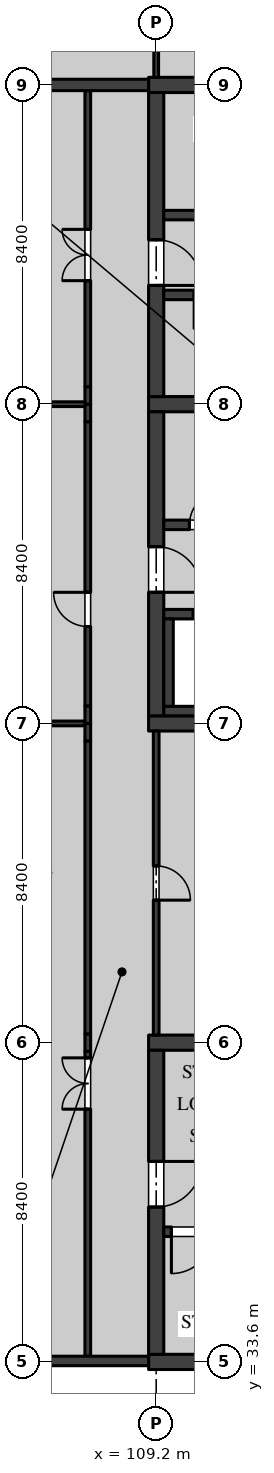
"""IFC4 building model, lengths in metres.
Left out: names, types, materials, properties, quantities, classifications, styles, units other than length and angle.
Written with IfcOpenShell. Run it as: python <this file> out.ifc"""

import sys

from ifc_helpers import new_model, si_unit, direction, frame, frame_2d, origin, place, context, subcontext, project, spatial, rectangle, extrude, element, fill, save


model = new_model("IFC4")
c1 = context("Model", 3, precision=1e-05, world=origin(), true_north=direction((0.0, 1.0)))
c2 = subcontext(c1, "Body", "Model", "MODEL_VIEW")
j1 = project(units=[si_unit("LENGTHUNIT", "METRE"), si_unit("PLANEANGLEUNIT", "RADIAN")], contexts=[c1])
p1 = place(None, origin())
s1 = spatial("IfcSite", under=j1, at=p1, CompositionType="ELEMENT")
p2 = place(p1, origin())
s2 = spatial("IfcBuilding", under=s1, at=p2, CompositionType="ELEMENT")
p3 = place(p2, frame((0.0, 0.0, 18.9)))
s3 = spatial("IfcBuildingStorey", under=s2, at=p3, CompositionType="ELEMENT", Elevation=18.9)
p4 = place(p3, frame((109.0, 50.4, 0.0), z_axis=(0.0, 0.0, 1.0), x_axis=(1.0, 0.0, 0.0)))
e1 = element("IfcWall", 1, at=p4, inside=s3, PredefinedType="SHEAR", context=c2, shape_type="SweptSolid", body=[
    extrude(rectangle(XDim=8.8, YDim=0.4, at=frame_2d((4.4, 0.0))), origin(), (0.0, 0.0, 1.0), 4.37),
])
p5 = place(p3, frame((109.0, 58.8, 0.0), z_axis=(0.0, 0.0, 1.0), x_axis=(1.0, 0.0, 0.0)))
e2 = element("IfcWall", 2, at=p5, inside=s3, PredefinedType="SHEAR", context=c2, shape_type="SweptSolid", body=[
    extrude(rectangle(XDim=8.8, YDim=0.4, at=frame_2d((4.4, 0.0))), origin(), (0.0, 0.0, 1.0), 4.37),
])
p6 = place(p5, frame((6.65, 0.0, 0.0)))
e3 = element("IfcOpeningElement", 3, at=p6, cuts=e2, PredefinedType="OPENING", context=c2, shape_type="SweptSolid", body=[
    extrude(rectangle(XDim=1.1, YDim=2.1, at=frame_2d((0.55, 1.05))), frame((0.0, 0.21, 0.0), z_axis=(0.0, -1.0, 0.0), x_axis=(1.0, 0.0, 0.0)), (0.0, 0.0, 1.0), 0.42),
])
p7 = place(p3, frame((109.2, 50.6, 0.0), z_axis=(0.0, 0.0, 1.0), x_axis=(0.0, 1.0, 0.0)))
e4 = element("IfcWall", 4, at=p7, inside=s3, PredefinedType="SHEAR", context=c2, shape_type="SweptSolid", body=[
    extrude(rectangle(XDim=8.0, YDim=0.4, at=frame_2d((4.0, 0.0))), origin(), (0.0, 0.0, 1.0), 4.37),
])
p8 = place(p7, frame((3.25, 0.0, 0.0)))
e5 = element("IfcOpeningElement", 5, at=p8, cuts=e4, PredefinedType="OPENING", context=c2, shape_type="SweptSolid", body=[
    extrude(rectangle(XDim=1.2, YDim=2.1, at=frame_2d((0.6, 1.05))), frame((0.0, 0.21, 0.0), z_axis=(0.0, -1.0, 0.0), x_axis=(1.0, 0.0, 0.0)), (0.0, 0.0, 1.0), 0.42),
])
p9 = place(p3, frame((109.4, 55.625, 0.0), z_axis=(0.0, 0.0, 1.0), x_axis=(1.0, 0.0, 0.0)))
e6 = element("IfcWall", 6, at=p9, inside=s3, PredefinedType="SOLIDWALL", context=c2, shape_type="SweptSolid", body=[
    extrude(rectangle(XDim=2.25, YDim=0.25, at=frame_2d((1.125, 0.0))), origin(), (0.0, 0.0, 1.0), 4.37),
])
p10 = place(p9, frame((0.675, 0.0, 0.0)))
e7 = element("IfcOpeningElement", 7, at=p10, cuts=e6, PredefinedType="OPENING", context=c2, shape_type="SweptSolid", body=[
    extrude(rectangle(XDim=0.9, YDim=2.1, at=frame_2d((0.45, 1.05))), frame((0.0, 0.135, 0.0), z_axis=(0.0, -1.0, 0.0), x_axis=(1.0, 0.0, 0.0)), (0.0, 0.0, 1.0), 0.27),
])
p11 = place(p3, frame((109.0, 67.2, 0.0), z_axis=(0.0, 0.0, 1.0), x_axis=(1.0, 0.0, 0.0)))
e8 = element("IfcWall", 8, at=p11, inside=s3, PredefinedType="SHEAR", context=c2, shape_type="SweptSolid", body=[
    extrude(rectangle(XDim=8.8, YDim=0.4, at=frame_2d((4.4, 0.0))), origin(), (0.0, 0.0, 1.0), 4.37),
])
p12 = place(p3, frame((109.2, 59.0, 0.0), z_axis=(0.0, 0.0, 1.0), x_axis=(0.0, 1.0, 0.0)))
e9 = element("IfcWall", 9, at=p12, inside=s3, PredefinedType="SHEAR", context=c2, shape_type="SweptSolid", body=[
    extrude(rectangle(XDim=8.0, YDim=0.4, at=frame_2d((4.0, 0.0))), origin(), (0.0, 0.0, 1.0), 4.37),
])
p13 = place(p12, frame((2.925, 0.0, 0.0)))
e10 = element("IfcOpeningElement", 10, at=p13, cuts=e9, PredefinedType="OPENING", context=c2, shape_type="SweptSolid", body=[
    extrude(rectangle(XDim=1.2, YDim=2.1, at=frame_2d((0.6, 1.05))), frame((0.0, 0.21, 0.0), z_axis=(0.0, -1.0, 0.0), x_axis=(1.0, 0.0, 0.0)), (0.0, 0.0, 1.0), 0.42),
])
p14 = place(p3, frame((117.4, 63.775, 0.0), z_axis=(0.0, 0.0, 1.0), x_axis=(-1.0, 0.0, 0.0)))
e11 = element("IfcWall", 11, at=p14, inside=s3, PredefinedType="SOLIDWALL", context=c2, shape_type="SweptSolid", body=[
    extrude(rectangle(XDim=8.0, YDim=0.25, at=frame_2d((4.0, 0.0))), origin(), (0.0, 0.0, 1.0), 4.37),
])
p15 = place(p14, frame((0.2, 0.0, 0.0)))
e12 = element("IfcOpeningElement", 12, at=p15, cuts=e11, PredefinedType="OPENING", context=c2, shape_type="SweptSolid", body=[
    extrude(rectangle(XDim=1.1, YDim=2.1, at=frame_2d((0.55, 1.05))), frame((0.0, 0.135, 0.0), z_axis=(0.0, -1.0, 0.0), x_axis=(1.0, 0.0, 0.0)), (0.0, 0.0, 1.0), 0.27),
])
p16 = place(p3, frame((114.75, 61.675, 0.0), z_axis=(0.0, 0.0, 1.0), x_axis=(-1.0, 0.0, 0.0)))
e13 = element("IfcWall", 13, at=p16, inside=s3, PredefinedType="SOLIDWALL", context=c2, shape_type="SweptSolid", body=[
    extrude(rectangle(XDim=5.35, YDim=0.25, at=frame_2d((2.675, 0.0))), origin(), (0.0, 0.0, 1.0), 4.37),
])
p17 = place(p16, frame((3.65, 0.0, 0.0)))
e14 = element("IfcOpeningElement", 14, at=p17, cuts=e13, PredefinedType="OPENING", context=c2, shape_type="SweptSolid", body=[
    extrude(rectangle(XDim=0.9, YDim=2.1, at=frame_2d((0.45, 1.05))), frame((0.0, 0.135, 0.0), z_axis=(0.0, -1.0, 0.0), x_axis=(1.0, 0.0, 0.0)), (0.0, 0.0, 1.0), 0.27),
])
p18 = place(p16, frame((0.9, 0.0, 0.0)))
e15 = element("IfcOpeningElement", 15, at=p18, cuts=e13, PredefinedType="OPENING", context=c2, shape_type="SweptSolid", body=[
    extrude(rectangle(XDim=0.8, YDim=2.1, at=frame_2d((0.4, 1.05))), frame((0.0, 0.135, 0.0), z_axis=(0.0, -1.0, 0.0), x_axis=(1.0, 0.0, 0.0)), (0.0, 0.0, 1.0), 0.27),
])
for number, where, z_axis, x_axis in (
    (16, (109.0, 33.6, 0.0), (0.0, 0.0, 1.0), (1.0, 0.0, 0.0)),
    (17, (109.0, 42.0, 0.0), (0.0, 0.0, 1.0), (1.0, 0.0, 0.0)),
):
    element("IfcWall", number, at=place(p3, frame(where, z_axis=z_axis, x_axis=x_axis)), inside=s3, PredefinedType="SHEAR", context=c2, shape_type="SweptSolid", body=[
        extrude(rectangle(XDim=8.8, YDim=0.4, at=frame_2d((4.4, 0.0))), origin(), (0.0, 0.0, 1.0), 4.37),
    ])
p19 = place(p3, frame((109.2, 33.8, 0.0), z_axis=(0.0, 0.0, 1.0), x_axis=(0.0, 1.0, 0.0)))
e18 = element("IfcWall", 18, at=p19, inside=s3, PredefinedType="SHEAR", context=c2, shape_type="SweptSolid", body=[
    extrude(rectangle(XDim=8.0, YDim=0.4, at=frame_2d((4.0, 0.0))), origin(), (0.0, 0.0, 1.0), 4.37),
])
p20 = place(p19, frame((3.875, 0.0, 0.0)))
e19 = element("IfcOpeningElement", 19, at=p20, cuts=e18, PredefinedType="OPENING", context=c2, shape_type="SweptSolid", body=[
    extrude(rectangle(XDim=1.2, YDim=2.1, at=frame_2d((0.6, 1.05))), frame((0.0, 0.21, 0.0), z_axis=(0.0, -1.0, 0.0), x_axis=(1.0, 0.0, 0.0)), (0.0, 0.0, 1.0), 0.42),
])
p21 = place(p3, frame((109.4, 37.025, 0.0), z_axis=(0.0, 0.0, 1.0), x_axis=(1.0, 0.0, 0.0)))
e20 = element("IfcWall", 20, at=p21, inside=s3, PredefinedType="SOLIDWALL", context=c2, shape_type="SweptSolid", body=[
    extrude(rectangle(XDim=8.0, YDim=0.25, at=frame_2d((4.0, 0.0))), origin(), (0.0, 0.0, 1.0), 4.37),
])
p22 = place(p21, frame((0.2, 0.0, 0.0)))
e21 = element("IfcOpeningElement", 21, at=p22, cuts=e20, PredefinedType="OPENING", context=c2, shape_type="SweptSolid", body=[
    extrude(rectangle(XDim=1.1, YDim=2.1, at=frame_2d((0.55, 1.05))), frame((0.0, 0.135, 0.0), z_axis=(0.0, -1.0, 0.0), x_axis=(1.0, 0.0, 0.0)), (0.0, 0.0, 1.0), 0.27),
])
p23 = place(p3, frame((109.4, 53.275, 0.0), z_axis=(0.0, 0.0, 1.0), x_axis=(1.0, 0.0, 0.0)))
e22 = element("IfcWall", 22, at=p23, inside=s3, PredefinedType="SOLIDWALL", context=c2, shape_type="SweptSolid", body=[
    extrude(rectangle(XDim=2.65, YDim=0.25, at=frame_2d((1.325, 0.0))), origin(), (0.0, 0.0, 1.0), 4.37),
])
p24 = place(p23, frame((0.775, 0.0, 0.0)))
e23 = element("IfcOpeningElement", 23, at=p24, cuts=e22, PredefinedType="OPENING", context=c2, shape_type="SweptSolid", body=[
    extrude(rectangle(XDim=1.1, YDim=2.1, at=frame_2d((0.55, 1.05))), frame((0.0, 0.135, 0.0), z_axis=(0.0, -1.0, 0.0), x_axis=(1.0, 0.0, 0.0)), (0.0, 0.0, 1.0), 0.27),
])
p25 = place(p3, frame((109.4, 50.725, 0.0), z_axis=(0.0, 0.0, 1.0), x_axis=(1.0, 0.0, 0.0)))
e24 = element("IfcWall", 24, at=p25, inside=s3, PredefinedType="SOLIDWALL", context=c2, shape_type="SweptSolid", body=[
    extrude(rectangle(XDim=2.65, YDim=0.25, at=frame_2d((1.325, 0.0))), origin(), (0.0, 0.0, 1.0), 4.37),
])
p26 = place(p3, frame((109.525, 50.85, 0.0), z_axis=(0.0, 0.0, 1.0), x_axis=(0.0, 1.0, 0.0)))
e25 = element("IfcWall", 25, at=p26, inside=s3, PredefinedType="SOLIDWALL", context=c2, shape_type="SweptSolid", body=[
    extrude(rectangle(XDim=2.3, YDim=0.25, at=frame_2d((1.15, 0.0))), origin(), (0.0, 0.0, 1.0), 4.37),
])
p27 = place(p3, frame((109.2, 42.2, 0.0), z_axis=(0.0, 0.0, 1.0), x_axis=(0.0, 1.0, 0.0)))
e26 = element("IfcWall", 26, at=p27, inside=s3, PredefinedType="PARTITIONING", context=c2, shape_type="SweptSolid", body=[
    extrude(rectangle(XDim=8.0, YDim=0.15, at=frame_2d((4.0, 0.0))), origin(), (0.0, 0.0, 1.0), 3.746),
])
p28 = place(p27, frame((3.55, 0.0, 0.0)))
e27 = element("IfcOpeningElement", 27, at=p28, cuts=e26, PredefinedType="OPENING", context=c2, shape_type="SweptSolid", body=[
    extrude(rectangle(XDim=0.9, YDim=2.1, at=frame_2d((0.45, 1.05))), frame((0.0, 0.085, 0.0), z_axis=(0.0, -1.0, 0.0), x_axis=(1.0, 0.0, 0.0)), (0.0, 0.0, 1.0), 0.17),
])
p29 = place(p3, frame((107.4, 33.75, 0.0), z_axis=(0.0, 0.0, 1.0), x_axis=(0.0, 1.0, 0.0)))
e28 = element("IfcWall", 28, at=p29, inside=s3, PredefinedType="PARTITIONING", context=c2, shape_type="SweptSolid", body=[
    extrude(rectangle(XDim=8.02, YDim=0.15, at=frame_2d((4.01, 0.0))), origin(), (0.0, 0.0, 1.0), 4.37),
])
p30 = place(p29, frame((6.5, 0.0, 0.0)))
e29 = element("IfcOpeningElement", 29, at=p30, cuts=e28, PredefinedType="OPENING", context=c2, shape_type="SweptSolid", body=[
    extrude(rectangle(XDim=1.35, YDim=2.1, at=frame_2d((0.675, 1.05))), frame((0.0, 0.085, 0.0), z_axis=(0.0, -1.0, 0.0), x_axis=(1.0, 0.0, 0.0)), (0.0, 0.0, 1.0), 0.17),
])
p31 = place(p3, frame((107.4, 41.77, 0.0), z_axis=(0.0, 0.0, 1.0), x_axis=(0.0, 1.0, 0.0)))
e30 = element("IfcWall", 30, at=p31, inside=s3, PredefinedType="PARTITIONING", context=c2, shape_type="SweptSolid", body=[
    extrude(rectangle(XDim=0.46, YDim=0.15, at=frame_2d((0.23, 0.0))), origin(), (0.0, 0.0, 1.0), 3.746),
])
p32 = place(p3, frame((107.4, 42.23, 0.0), z_axis=(0.0, 0.0, 1.0), x_axis=(0.0, 1.0, 0.0)))
e31 = element("IfcWall", 31, at=p32, inside=s3, PredefinedType="PARTITIONING", context=c2, shape_type="SweptSolid", body=[
    extrude(rectangle(XDim=7.71, YDim=0.15, at=frame_2d((3.855, 0.0))), origin(), (0.0, 0.0, 1.0), 4.37),
])
p33 = place(p3, frame((107.4, 49.94, 0.0), z_axis=(0.0, 0.0, 1.0), x_axis=(0.0, 1.0, 0.0)))
e32 = element("IfcWall", 32, at=p33, inside=s3, PredefinedType="PARTITIONING", context=c2, shape_type="SweptSolid", body=[
    extrude(rectangle(XDim=0.46, YDim=0.15, at=frame_2d((0.23, 0.0))), origin(), (0.0, 0.0, 1.0), 3.746),
])
p34 = place(p3, frame((107.4, 50.4, 0.0), z_axis=(0.0, 0.0, 1.0), x_axis=(0.0, 1.0, 0.0)))
e33 = element("IfcWall", 33, at=p34, inside=s3, PredefinedType="PARTITIONING", context=c2, shape_type="SweptSolid", body=[
    extrude(rectangle(XDim=0.46, YDim=0.15, at=frame_2d((0.23, 0.0))), origin(), (0.0, 0.0, 1.0), 3.746),
])
p35 = place(p3, frame((107.4, 50.86, 0.0), z_axis=(0.0, 0.0, 1.0), x_axis=(0.0, 1.0, 0.0)))
e34 = element("IfcWall", 34, at=p35, inside=s3, PredefinedType="PARTITIONING", context=c2, shape_type="SweptSolid", body=[
    extrude(rectangle(XDim=7.48, YDim=0.15, at=frame_2d((3.74, 0.0))), origin(), (0.0, 0.0, 1.0), 4.37),
])
p36 = place(p35, frame((2.09, 0.0, 0.0)))
e35 = element("IfcOpeningElement", 35, at=p36, cuts=e34, PredefinedType="OPENING", context=c2, shape_type="SweptSolid", body=[
    extrude(rectangle(XDim=0.9, YDim=2.1, at=frame_2d((0.45, 1.05))), frame((0.0, 0.085, 0.0), z_axis=(0.0, -1.0, 0.0), x_axis=(1.0, 0.0, 0.0)), (0.0, 0.0, 1.0), 0.17),
])
for number, where, z_axis, x_axis in (
    (36, (107.4, 58.34, 0.0), (0.0, 0.0, 1.0), (0.0, 1.0, 0.0)),
    (37, (107.4, 58.8, 0.0), (0.0, 0.0, 1.0), (0.0, 1.0, 0.0)),
):
    element("IfcWall", number, at=place(p3, frame(where, z_axis=z_axis, x_axis=x_axis)), inside=s3, PredefinedType="PARTITIONING", context=c2, shape_type="SweptSolid", body=[
        extrude(rectangle(XDim=0.46, YDim=0.15, at=frame_2d((0.23, 0.0))), origin(), (0.0, 0.0, 1.0), 3.746),
    ])
p37 = place(p3, frame((107.4, 59.26, 0.0), z_axis=(0.0, 0.0, 1.0), x_axis=(0.0, 1.0, 0.0)))
e38 = element("IfcWall", 38, at=p37, inside=s3, PredefinedType="PARTITIONING", context=c2, shape_type="SweptSolid", body=[
    extrude(rectangle(XDim=7.79, YDim=0.15, at=frame_2d((3.895, 0.0))), origin(), (0.0, 0.0, 1.0), 4.37),
])
p38 = place(p37, frame((2.79, 0.0, 0.0)))
e39 = element("IfcOpeningElement", 39, at=p38, cuts=e38, PredefinedType="OPENING", context=c2, shape_type="SweptSolid", body=[
    extrude(rectangle(XDim=1.35, YDim=2.1, at=frame_2d((0.675, 1.05))), frame((0.0, 0.085, 0.0), z_axis=(0.0, -1.0, 0.0), x_axis=(1.0, 0.0, 0.0)), (0.0, 0.0, 1.0), 0.17),
])
for number, where, z_axis, x_axis in (
    (40, (105.0, 50.4, 0.0), (0.0, 0.0, 1.0), (1.0, 0.0, 0.0)),
    (41, (105.0, 58.8, 0.0), (0.0, 0.0, 1.0), (1.0, 0.0, 0.0)),
):
    element("IfcWall", number, at=place(p3, frame(where, z_axis=z_axis, x_axis=x_axis)), inside=s3, PredefinedType="PARTITIONING", context=c2, shape_type="SweptSolid", body=[
        extrude(rectangle(XDim=2.325, YDim=0.125, at=frame_2d((1.163, 0.0))), origin(), (0.0, 0.0, 1.0), 3.746),
    ])
p39 = place(p3, frame((109.2, 67.4, 0.0), z_axis=(0.0, 0.0, 1.0), x_axis=(0.0, 1.0, 0.0)))
e42 = element("IfcWall", 42, at=p39, inside=s3, PredefinedType="PARTITIONING", context=c2, shape_type="SweptSolid", body=[
    extrude(rectangle(XDim=6.625, YDim=0.125, at=frame_2d((3.312, 0.0))), origin(), (0.0, 0.0, 1.0), 3.819),
])
p40 = place(p3, frame((100.803, 33.625, 0.0), z_axis=(0.0, 0.0, 1.0), x_axis=(1.0, 0.0, 0.0)))
e43 = element("IfcWall", 43, at=p40, inside=s3, PredefinedType="SOLIDWALL", context=c2, shape_type="SweptSolid", body=[
    extrude(rectangle(XDim=8.197, YDim=0.25, at=frame_2d((4.099, 0.0))), origin(), (0.0, 0.0, 1.0), 3.746),
])
p41 = place(p40, frame((0.897, 0.0, 0.9)))
e44 = element("IfcOpeningElement", 44, at=p41, cuts=e43, PredefinedType="OPENING", context=c2, shape_type="SweptSolid", body=[
    extrude(rectangle(XDim=2.4, YDim=2.1, at=frame_2d((1.2, 1.05))), frame((0.0, 0.135, 0.0), z_axis=(0.0, -1.0, 0.0), x_axis=(1.0, 0.0, 0.0)), (0.0, 0.0, 1.0), 0.27),
])
p42 = place(p3, frame((109.0, 67.2, 0.0), z_axis=(0.0, 0.0, 1.0), x_axis=(-1.0, 0.0, 0.0)))
e45 = element("IfcWall", 45, at=p42, inside=s3, PredefinedType="SOLIDWALL", context=c2, shape_type="SweptSolid", body=[
    extrude(rectangle(XDim=8.197, YDim=0.3, at=frame_2d((4.099, 0.0))), origin(), (0.0, 0.0, 1.0), 3.746),
])
p43 = place(p8, frame((1.2, 0.0, 0.0), z_axis=(0.0, 0.0, 1.0), x_axis=(-1.0, 0.0, 0.0)))
e46 = element("IfcDoor", 46, at=p43, inside=s3, OperationType="SINGLE_SWING_LEFT", PredefinedType="DOOR", context=c2, shape_type="SweptSolid", body=[
    extrude(rectangle(XDim=1.2, YDim=2.1, at=frame_2d((0.6, 1.05))), frame((0.0, 0.035, 0.0), z_axis=(0.0, -1.0, 0.0), x_axis=(1.0, 0.0, 0.0)), (0.0, 0.0, 1.0), 0.07),
])
fill(e5, e46)
p44 = place(p10, origin())
e47 = element("IfcDoor", 47, at=p44, inside=s3, OperationType="SINGLE_SWING_LEFT", PredefinedType="DOOR", context=c2, shape_type="SweptSolid", body=[
    extrude(rectangle(XDim=0.9, YDim=2.1, at=frame_2d((0.45, 1.05))), frame((0.0, 0.05, 0.0), z_axis=(0.0, -1.0, 0.0), x_axis=(1.0, 0.0, 0.0)), (0.0, 0.0, 1.0), 0.1),
])
fill(e7, e47)
p45 = place(p13, frame((1.2, 0.0, 0.0), z_axis=(0.0, 0.0, 1.0), x_axis=(-1.0, 0.0, 0.0)))
e48 = element("IfcDoor", 48, at=p45, inside=s3, OperationType="SINGLE_SWING_LEFT", PredefinedType="DOOR", context=c2, shape_type="SweptSolid", body=[
    extrude(rectangle(XDim=1.2, YDim=2.1, at=frame_2d((0.6, 1.05))), frame((0.0, 0.035, 0.0), z_axis=(0.0, -1.0, 0.0), x_axis=(1.0, 0.0, 0.0)), (0.0, 0.0, 1.0), 0.07),
])
fill(e10, e48)
p46 = place(p20, frame((1.2, 0.0, 0.0), z_axis=(0.0, 0.0, 1.0), x_axis=(-1.0, 0.0, 0.0)))
e49 = element("IfcDoor", 49, at=p46, inside=s3, OperationType="SINGLE_SWING_RIGHT", PredefinedType="DOOR", context=c2, shape_type="SweptSolid", body=[
    extrude(rectangle(XDim=1.2, YDim=2.1, at=frame_2d((0.6, 1.05))), frame((0.0, 0.035, 0.0), z_axis=(0.0, -1.0, 0.0), x_axis=(1.0, 0.0, 0.0)), (0.0, 0.0, 1.0), 0.07),
])
fill(e19, e49)
p47 = place(p22, frame((1.1, 0.0, 0.0), z_axis=(0.0, 0.0, 1.0), x_axis=(-1.0, 0.0, 0.0)))
e50 = element("IfcDoor", 50, at=p47, inside=s3, OperationType="SINGLE_SWING_LEFT", PredefinedType="DOOR", context=c2, shape_type="SweptSolid", body=[
    extrude(rectangle(XDim=1.1, YDim=2.1, at=frame_2d((0.55, 1.05))), frame((0.0, 0.035, 0.0), z_axis=(0.0, -1.0, 0.0), x_axis=(1.0, 0.0, 0.0)), (0.0, 0.0, 1.0), 0.07),
])
fill(e21, e50)
p48 = place(p24, origin())
e51 = element("IfcDoor", 51, at=p48, inside=s3, OperationType="DOUBLE_DOOR_SLIDING", PredefinedType="DOOR", context=c2, shape_type="SweptSolid", body=[
    extrude(rectangle(XDim=1.1, YDim=2.1, at=frame_2d((0.55, 1.05))), frame((0.0, 0.04, 0.0), z_axis=(0.0, -1.0, 0.0), x_axis=(1.0, 0.0, 0.0)), (0.0, 0.0, 1.0), 0.08),
])
fill(e23, e51)
p49 = place(p28, frame((0.9, 0.0, 0.0), z_axis=(0.0, 0.0, 1.0), x_axis=(-1.0, 0.0, 0.0)))
e52 = element("IfcDoor", 52, at=p49, inside=s3, OperationType="SINGLE_SWING_LEFT", PredefinedType="DOOR", context=c2, shape_type="SweptSolid", body=[
    extrude(rectangle(XDim=0.9, YDim=2.1, at=frame_2d((0.45, 1.05))), frame((0.0, 0.025, 0.0), z_axis=(0.0, -1.0, 0.0), x_axis=(1.0, 0.0, 0.0)), (0.0, 0.0, 1.0), 0.05),
])
fill(e27, e52)
p50 = place(p30, origin())
e53 = element("IfcDoor", 53, at=p50, inside=s3, OperationType="DOUBLE_DOOR_SINGLE_SWING", PredefinedType="DOOR", context=c2, shape_type="SweptSolid", body=[
    extrude(rectangle(XDim=1.35, YDim=2.1, at=frame_2d((0.675, 1.05))), frame((0.0, 0.025, 0.0), z_axis=(0.0, -1.0, 0.0), x_axis=(1.0, 0.0, 0.0)), (0.0, 0.0, 1.0), 0.05),
])
fill(e29, e53)
p51 = place(p36, origin())
e54 = element("IfcDoor", 54, at=p51, inside=s3, OperationType="SINGLE_SWING_LEFT", PredefinedType="DOOR", context=c2, shape_type="SweptSolid", body=[
    extrude(rectangle(XDim=0.9, YDim=2.1, at=frame_2d((0.45, 1.05))), frame((0.0, 0.025, 0.0), z_axis=(0.0, -1.0, 0.0), x_axis=(1.0, 0.0, 0.0)), (0.0, 0.0, 1.0), 0.05),
])
fill(e35, e54)
p52 = place(p38, origin())
e55 = element("IfcDoor", 55, at=p52, inside=s3, OperationType="DOUBLE_DOOR_SINGLE_SWING", PredefinedType="DOOR", context=c2, shape_type="SweptSolid", body=[
    extrude(rectangle(XDim=1.35, YDim=2.1, at=frame_2d((0.675, 1.05))), frame((0.0, 0.025, 0.0), z_axis=(0.0, -1.0, 0.0), x_axis=(1.0, 0.0, 0.0)), (0.0, 0.0, 1.0), 0.05),
])
fill(e39, e55)
save(model, sys.argv[1])
